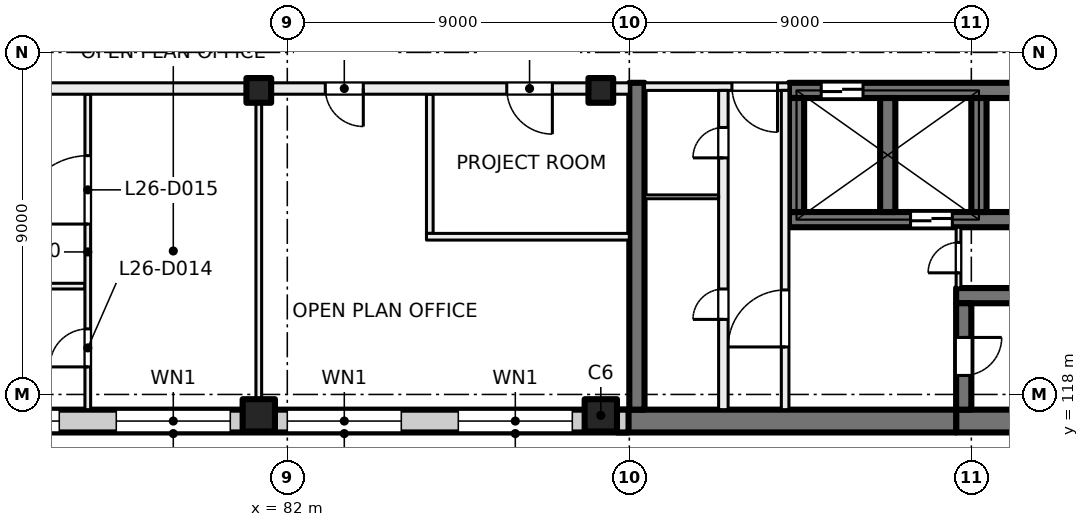
"""IFC4 building model, lengths in metres.
Left out: names, types, materials, properties, quantities, classifications, styles, units other than length and angle.
Written with IfcOpenShell. Run it as: python <this file> out.ifc"""

import sys

from ifc_helpers import new_model, si_unit, direction, frame, frame_2d, origin, origin_2d, place, context, subcontext, project, spatial, rectangle, extrude, element, fill, save


model = new_model("IFC4")
c1 = context("Model", 3, precision=1e-05, world=origin(), true_north=direction((0.0, 1.0)))
c2 = subcontext(c1, "Body", "Model", "MODEL_VIEW")
j1 = project(units=[si_unit("LENGTHUNIT", "METRE"), si_unit("PLANEANGLEUNIT", "RADIAN")], contexts=[c1])
p1 = place(None, origin())
s1 = spatial("IfcSite", under=j1, at=p1, CompositionType="ELEMENT")
p2 = place(p1, origin())
s2 = spatial("IfcBuilding", under=s1, at=p2, CompositionType="ELEMENT")
p3 = place(p2, frame((0.0, 0.0, 113.0)))
s3 = spatial("IfcBuildingStorey", under=s2, at=p3, CompositionType="ELEMENT", Elevation=113.0)
for number, where, z_axis, x_axis in (
    (1, (81.25, 126.0, 0.0), (0.0, 0.0, 1.0), (1.0, 0.0, 0.0)),
    (2, (90.25, 126.0, 0.0), (0.0, 0.0, 1.0), (1.0, 0.0, 0.0)),
):
    element("IfcColumn", number, at=place(p3, frame(where, z_axis=z_axis, x_axis=x_axis)), inside=s3, PredefinedType="COLUMN", context=c2, shape_type="SweptSolid", body=[
        extrude(rectangle(XDim=0.65, YDim=0.65, at=origin_2d()), origin(), (0.0, 0.0, 1.0), 4.0),
    ])
for number, where, z_axis, x_axis in (
    (3, (81.25, 117.45, 0.0), (0.0, 0.0, 1.0), (1.0, 0.0, 0.0)),
    (4, (90.25, 117.45, 0.0), (0.0, 0.0, 1.0), (1.0, 0.0, 0.0)),
):
    element("IfcColumn", number, at=place(p3, frame(where, z_axis=z_axis, x_axis=x_axis)), inside=s3, PredefinedType="COLUMN", context=c2, shape_type="SweptSolid", body=[
        extrude(rectangle(XDim=0.85, YDim=0.85, at=origin_2d()), origin(), (0.0, 0.0, 1.0), 4.0),
    ])
p4 = place(p3, frame((107.4, 117.3, 0.0), z_axis=(0.0, 0.0, 1.0), x_axis=(-1.0, 0.0, 0.0)))
e5 = element("IfcWall", 5, at=p4, inside=s3, PredefinedType="SHEAR", context=c2, shape_type="SweptSolid", body=[
    extrude(rectangle(XDim=7.8, YDim=0.6, at=frame_2d((3.9, 0.0))), origin(), (0.0, 0.0, 1.0), 4.0),
])
p5 = place(p3, frame((99.6, 117.3, 0.0), z_axis=(0.0, 0.0, 1.0), x_axis=(-1.0, 0.0, 0.0)))
e6 = element("IfcWall", 6, at=p5, inside=s3, PredefinedType="SHEAR", context=c2, shape_type="SweptSolid", body=[
    extrude(rectangle(XDim=8.925, YDim=0.6, at=frame_2d((4.462, 0.0))), origin(), (0.0, 0.0, 1.0), 4.0),
])
p6 = place(p3, frame((107.4, 120.6, 0.0), z_axis=(0.0, 0.0, 1.0), x_axis=(-1.0, 0.0, 0.0)))
e7 = element("IfcWall", 7, at=p6, inside=s3, PredefinedType="SHEAR", context=c2, shape_type="SweptSolid", body=[
    extrude(rectangle(XDim=7.8, YDim=0.4, at=frame_2d((3.9, 0.0))), origin(), (0.0, 0.0, 1.0), 4.0),
])
p7 = place(p3, frame((99.8, 120.4, 0.0), z_axis=(0.0, 0.0, 1.0), x_axis=(0.0, -1.0, 0.0)))
e8 = element("IfcWall", 8, at=p7, inside=s3, PredefinedType="SHEAR", context=c2, shape_type="SweptSolid", body=[
    extrude(rectangle(XDim=2.8, YDim=0.4, at=frame_2d((1.4, 0.0))), origin(), (0.0, 0.0, 1.0), 4.0),
])
p8 = place(p7, frame((0.9, 0.0, 0.0)))
e9 = element("IfcOpeningElement", 9, at=p8, cuts=e8, PredefinedType="OPENING", context=c2, shape_type="SweptSolid", body=[
    extrude(rectangle(XDim=1.0, YDim=2.1, at=frame_2d((0.5, 1.05))), frame((0.0, 0.21, 0.0), z_axis=(0.0, -1.0, 0.0), x_axis=(1.0, 0.0, 0.0)), (0.0, 0.0, 1.0), 0.42),
])
p9 = place(p3, frame((107.4, 126.0, 0.0), z_axis=(0.0, 0.0, 1.0), x_axis=(-1.0, 0.0, 0.0)))
e10 = element("IfcWall", 10, at=p9, inside=s3, PredefinedType="SHEAR", context=c2, shape_type="SweptSolid", body=[
    extrude(rectangle(XDim=12.2, YDim=0.4, at=frame_2d((6.1, 0.0))), origin(), (0.0, 0.0, 1.0), 4.0),
])
p10 = place(p9, frame((10.25, 0.0, 0.0)))
e11 = element("IfcOpeningElement", 11, at=p10, cuts=e10, PredefinedType="OPENING", context=c2, shape_type="SweptSolid", body=[
    extrude(rectangle(XDim=1.1, YDim=2.1, at=frame_2d((0.55, 1.05))), frame((0.0, 0.21, 0.0), z_axis=(0.0, -1.0, 0.0), x_axis=(1.0, 0.0, 0.0)), (0.0, 0.0, 1.0), 0.42),
])
p11 = place(p9, frame((0.6, 0.0, 0.0)))
e12 = element("IfcOpeningElement", 12, at=p11, cuts=e10, PredefinedType="OPENING", context=c2, shape_type="SweptSolid", body=[
    extrude(rectangle(XDim=1.0, YDim=2.1, at=frame_2d((0.5, 1.05))), frame((0.0, 0.21, 0.0), z_axis=(0.0, -1.0, 0.0), x_axis=(1.0, 0.0, 0.0)), (0.0, 0.0, 1.0), 0.42),
])
p12 = place(p3, frame((107.4, 122.6, 0.0), z_axis=(0.0, 0.0, 1.0), x_axis=(-1.0, 0.0, 0.0)))
e13 = element("IfcWall", 13, at=p12, inside=s3, PredefinedType="SHEAR", context=c2, shape_type="SweptSolid", body=[
    extrude(rectangle(XDim=12.2, YDim=0.4, at=frame_2d((6.1, 0.0))), origin(), (0.0, 0.0, 1.0), 4.0),
])
p13 = place(p12, frame((7.9, 0.0, 0.0)))
e14 = element("IfcOpeningElement", 14, at=p13, cuts=e13, PredefinedType="OPENING", context=c2, shape_type="SweptSolid", body=[
    extrude(rectangle(XDim=1.1, YDim=2.1, at=frame_2d((0.55, 1.05))), frame((0.0, 0.21, 0.0), z_axis=(0.0, -1.0, 0.0), x_axis=(1.0, 0.0, 0.0)), (0.0, 0.0, 1.0), 0.42),
])
for number, where, z_axis, x_axis in (
    (15, (100.2, 125.8, 0.0), (0.0, 0.0, 1.0), (0.0, -1.0, 0.0)),
    (16, (97.8, 125.8, 0.0), (0.0, 0.0, 1.0), (0.0, -1.0, 0.0)),
    (17, (95.4, 125.8, 0.0), (0.0, 0.0, 1.0), (0.0, -1.0, 0.0)),
):
    element("IfcWall", number, at=place(p3, frame(where, z_axis=z_axis, x_axis=x_axis)), inside=s3, PredefinedType="SHEAR", context=c2, shape_type="SweptSolid", body=[
        extrude(rectangle(XDim=3.0, YDim=0.4, at=frame_2d((1.5, 0.0))), origin(), (0.0, 0.0, 1.0), 4.0),
    ])
p14 = place(p3, frame((91.2, 126.2, 0.0), z_axis=(0.0, 0.0, 1.0), x_axis=(0.0, -1.0, 0.0)))
e18 = element("IfcWall", 18, at=p14, inside=s3, PredefinedType="SHEAR", context=c2, shape_type="SweptSolid", body=[
    extrude(rectangle(XDim=8.6, YDim=0.4, at=frame_2d((4.3, 0.0))), origin(), (0.0, 0.0, 1.0), 4.0),
])
p15 = place(p3, frame((90.98, 117.3, 0.0), z_axis=(0.0, 0.0, 1.0), x_axis=(-1.0, 0.0, 0.0)))
e19 = element("IfcWall", 19, at=p15, inside=s3, PredefinedType="SOLIDWALL", context=c2, shape_type="SweptSolid", body=[
    extrude(rectangle(XDim=33.745, YDim=0.6, at=frame_2d((16.873, 0.0))), origin(), (0.0, 0.0, 1.0), 3.625),
])
p16 = place(p15, frame((1.48, 0.0, 0.9)))
e20 = element("IfcOpeningElement", 20, at=p16, cuts=e19, PredefinedType="OPENING", context=c2, shape_type="SweptSolid", body=[
    extrude(rectangle(XDim=3.0, YDim=2.4, at=frame_2d((1.5, 1.2))), frame((0.0, 0.31, 0.0), z_axis=(0.0, -1.0, 0.0), x_axis=(1.0, 0.0, 0.0)), (0.0, 0.0, 1.0), 0.62),
])
p17 = place(p15, frame((5.98, 0.0, 0.9)))
e21 = element("IfcOpeningElement", 21, at=p17, cuts=e19, PredefinedType="OPENING", context=c2, shape_type="SweptSolid", body=[
    extrude(rectangle(XDim=3.0, YDim=2.4, at=frame_2d((1.5, 1.2))), frame((0.0, 0.31, 0.0), z_axis=(0.0, -1.0, 0.0), x_axis=(1.0, 0.0, 0.0)), (0.0, 0.0, 1.0), 0.62),
])
p18 = place(p15, frame((10.48, 0.0, 0.9)))
e22 = element("IfcOpeningElement", 22, at=p18, cuts=e19, PredefinedType="OPENING", context=c2, shape_type="SweptSolid", body=[
    extrude(rectangle(XDim=3.0, YDim=2.4, at=frame_2d((1.5, 1.2))), frame((0.0, 0.31, 0.0), z_axis=(0.0, -1.0, 0.0), x_axis=(1.0, 0.0, 0.0)), (0.0, 0.0, 1.0), 0.62),
])
p19 = place(p15, frame((14.98, 0.0, 0.9)))
e23 = element("IfcOpeningElement", 23, at=p19, cuts=e19, PredefinedType="OPENING", context=c2, shape_type="SweptSolid", body=[
    extrude(rectangle(XDim=3.0, YDim=2.4, at=frame_2d((1.5, 1.2))), frame((0.0, 0.31, 0.0), z_axis=(0.0, -1.0, 0.0), x_axis=(1.0, 0.0, 0.0)), (0.0, 0.0, 1.0), 0.62),
])
p20 = place(p15, frame((19.48, 0.0, 0.9)))
e24 = element("IfcOpeningElement", 24, at=p20, cuts=e19, PredefinedType="OPENING", context=c2, shape_type="SweptSolid", body=[
    extrude(rectangle(XDim=3.0, YDim=2.4, at=frame_2d((1.5, 1.2))), frame((0.0, 0.31, 0.0), z_axis=(0.0, -1.0, 0.0), x_axis=(1.0, 0.0, 0.0)), (0.0, 0.0, 1.0), 0.62),
])
p21 = place(p15, frame((23.98, 0.0, 0.9)))
e25 = element("IfcOpeningElement", 25, at=p21, cuts=e19, PredefinedType="OPENING", context=c2, shape_type="SweptSolid", body=[
    extrude(rectangle(XDim=3.0, YDim=2.4, at=frame_2d((1.5, 1.2))), frame((0.0, 0.31, 0.0), z_axis=(0.0, -1.0, 0.0), x_axis=(1.0, 0.0, 0.0)), (0.0, 0.0, 1.0), 0.62),
])
p22 = place(p15, frame((28.48, 0.0, 0.9)))
e26 = element("IfcOpeningElement", 26, at=p22, cuts=e19, PredefinedType="OPENING", context=c2, shape_type="SweptSolid", body=[
    extrude(rectangle(XDim=3.0, YDim=2.4, at=frame_2d((1.5, 1.2))), frame((0.0, 0.31, 0.0), z_axis=(0.0, -1.0, 0.0), x_axis=(1.0, 0.0, 0.0)), (0.0, 0.0, 1.0), 0.62),
])
p23 = place(p3, frame((95.2, 126.1, 0.0), z_axis=(0.0, 0.0, 1.0), x_axis=(-1.0, 0.0, 0.0)))
e27 = element("IfcWall", 27, at=p23, inside=s3, PredefinedType="PARTITIONING", context=c2, shape_type="SweptSolid", body=[
    extrude(rectangle(XDim=3.8, YDim=0.2, at=frame_2d((1.9, 0.0))), origin(), (0.0, 0.0, 1.0), 3.625),
])
p24 = place(p23, frame((0.3, 0.0, 0.0)))
e28 = element("IfcOpeningElement", 28, at=p24, cuts=e27, PredefinedType="OPENING", context=c2, shape_type="SweptSolid", body=[
    extrude(rectangle(XDim=1.2, YDim=2.1, at=frame_2d((0.6, 1.05))), frame((0.0, 0.11, 0.0), z_axis=(0.0, -1.0, 0.0), x_axis=(1.0, 0.0, 0.0)), (0.0, 0.0, 1.0), 0.22),
])
p25 = place(p3, frame((95.1, 117.6, 0.0), z_axis=(0.0, 0.0, 1.0), x_axis=(0.0, 1.0, 0.0)))
e29 = element("IfcWall", 29, at=p25, inside=s3, PredefinedType="PARTITIONING", context=c2, shape_type="SweptSolid", body=[
    extrude(rectangle(XDim=8.4, YDim=0.2, at=frame_2d((4.2, 0.0))), origin(), (0.0, 0.0, 1.0), 3.625),
])
p26 = place(p25, frame((1.65, 0.0, 0.0)))
e30 = element("IfcOpeningElement", 30, at=p26, cuts=e29, PredefinedType="OPENING", context=c2, shape_type="SweptSolid", body=[
    extrude(rectangle(XDim=1.5, YDim=2.1, at=frame_2d((0.75, 1.05))), frame((0.0, 0.11, 0.0), z_axis=(0.0, -1.0, 0.0), x_axis=(1.0, 0.0, 0.0)), (0.0, 0.0, 1.0), 0.22),
])
p27 = place(p3, frame((93.475, 117.6, 0.0), z_axis=(0.0, 0.0, 1.0), x_axis=(0.0, 1.0, 0.0)))
e31 = element("IfcWall", 31, at=p27, inside=s3, PredefinedType="PARTITIONING", context=c2, shape_type="SweptSolid", body=[
    extrude(rectangle(XDim=8.4, YDim=0.25, at=frame_2d((4.2, 0.0))), origin(), (0.0, 0.0, 1.0), 3.625),
])
p28 = place(p27, frame((6.625, 0.0, 0.0)))
e32 = element("IfcOpeningElement", 32, at=p28, cuts=e31, PredefinedType="OPENING", context=c2, shape_type="SweptSolid", body=[
    extrude(rectangle(XDim=0.8, YDim=2.1, at=frame_2d((0.4, 1.05))), frame((0.0, 0.135, 0.0), z_axis=(0.0, -1.0, 0.0), x_axis=(1.0, 0.0, 0.0)), (0.0, 0.0, 1.0), 0.27),
])
p29 = place(p27, frame((2.375, 0.0, 0.0)))
e33 = element("IfcOpeningElement", 33, at=p29, cuts=e31, PredefinedType="OPENING", context=c2, shape_type="SweptSolid", body=[
    extrude(rectangle(XDim=0.8, YDim=2.1, at=frame_2d((0.4, 1.05))), frame((0.0, 0.135, 0.0), z_axis=(0.0, -1.0, 0.0), x_axis=(1.0, 0.0, 0.0)), (0.0, 0.0, 1.0), 0.27),
])
p30 = place(p3, frame((99.663, 120.8, 0.0), z_axis=(0.0, 0.0, 1.0), x_axis=(0.0, 1.0, 0.0)))
e34 = element("IfcWall", 34, at=p30, inside=s3, PredefinedType="PARTITIONING", context=c2, shape_type="SweptSolid", body=[
    extrude(rectangle(XDim=1.6, YDim=0.125, at=frame_2d((0.8, 0.0))), origin(), (0.0, 0.0, 1.0), 3.625),
])
p31 = place(p30, frame((0.4, 0.0, 0.0)))
e35 = element("IfcOpeningElement", 35, at=p31, cuts=e34, PredefinedType="OPENING", context=c2, shape_type="SweptSolid", body=[
    extrude(rectangle(XDim=0.8, YDim=2.1, at=frame_2d((0.4, 1.05))), frame((0.0, 0.073, 0.0), z_axis=(0.0, -1.0, 0.0), x_axis=(1.0, 0.0, 0.0)), (0.0, 0.0, 1.0), 0.145),
])
p32 = place(p3, frame((93.35, 123.2, 0.0), z_axis=(0.0, 0.0, 1.0), x_axis=(-1.0, 0.0, 0.0)))
e36 = element("IfcWall", 36, at=p32, inside=s3, PredefinedType="PARTITIONING", context=c2, shape_type="SweptSolid", body=[
    extrude(rectangle(XDim=1.95, YDim=0.1, at=frame_2d((0.975, 0.0))), origin(), (0.0, 0.0, 1.0), 3.625),
])
p33 = place(p3, frame((72.325, 120.85, 0.0), z_axis=(0.0, 0.0, 1.0), x_axis=(1.0, 0.0, 0.0)))
e37 = element("IfcWall", 37, at=p33, inside=s3, PredefinedType="PARTITIONING", context=c2, shape_type="SweptSolid", body=[
    extrude(rectangle(XDim=4.35, YDim=0.15, at=frame_2d((2.175, 0.0))), origin(), (0.0, 0.0, 1.0), 3.625),
])
p34 = place(p3, frame((76.75, 117.6, 0.0), z_axis=(0.0, 0.0, 1.0), x_axis=(0.0, 1.0, 0.0)))
e38 = element("IfcWall", 38, at=p34, inside=s3, PredefinedType="PARTITIONING", context=c2, shape_type="SweptSolid", body=[
    extrude(rectangle(XDim=8.3, YDim=0.15, at=frame_2d((4.15, 0.0))), origin(), (0.0, 0.0, 1.0), 3.625),
])
p35 = place(p34, frame((1.125, 0.0, 0.0)))
e39 = element("IfcOpeningElement", 39, at=p35, cuts=e38, PredefinedType="OPENING", context=c2, shape_type="SweptSolid", body=[
    extrude(rectangle(XDim=1.0, YDim=2.1, at=frame_2d((0.5, 1.05))), frame((0.0, 0.085, 0.0), z_axis=(0.0, -1.0, 0.0), x_axis=(1.0, 0.0, 0.0)), (0.0, 0.0, 1.0), 0.17),
])
p36 = place(p34, frame((4.884, 0.0, 0.0)))
e40 = element("IfcOpeningElement", 40, at=p36, cuts=e38, PredefinedType="OPENING", context=c2, shape_type="SweptSolid", body=[
    extrude(rectangle(XDim=1.8, YDim=2.1, at=frame_2d((0.9, 1.05))), frame((0.0, 0.085, 0.0), z_axis=(0.0, -1.0, 0.0), x_axis=(1.0, 0.0, 0.0)), (0.0, 0.0, 1.0), 0.17),
])
p37 = place(p3, frame((81.25, 117.6, 0.0), z_axis=(0.0, 0.0, 1.0), x_axis=(0.0, 1.0, 0.0)))
e41 = element("IfcWall", 41, at=p37, inside=s3, PredefinedType="PARTITIONING", context=c2, shape_type="SweptSolid", body=[
    extrude(rectangle(XDim=8.3, YDim=0.15, at=frame_2d((4.15, 0.0))), origin(), (0.0, 0.0, 1.0), 3.625),
])
p38 = place(p3, frame((85.75, 122.238, 0.0), z_axis=(0.0, 0.0, 1.0), x_axis=(0.0, 1.0, 0.0)))
e42 = element("IfcWall", 42, at=p38, inside=s3, PredefinedType="PARTITIONING", context=c2, shape_type="SweptSolid", body=[
    extrude(rectangle(XDim=3.662, YDim=0.175, at=frame_2d((1.831, 0.0))), origin(), (0.0, 0.0, 1.0), 3.625),
])
p39 = place(p3, frame((91.0, 122.15, 0.0), z_axis=(0.0, 0.0, 1.0), x_axis=(-1.0, 0.0, 0.0)))
e43 = element("IfcWall", 43, at=p39, inside=s3, PredefinedType="PARTITIONING", context=c2, shape_type="SweptSolid", body=[
    extrude(rectangle(XDim=5.338, YDim=0.175, at=frame_2d((2.669, 0.0))), origin(), (0.0, 0.0, 1.0), 3.625),
])
p40 = place(p3, frame((91.0, 126.05, 0.0), z_axis=(0.0, 0.0, 1.0), x_axis=(-1.0, 0.0, 0.0)))
e44 = element("IfcWall", 44, at=p40, inside=s3, PredefinedType="PARTITIONING", context=c2, shape_type="SweptSolid", body=[
    extrude(rectangle(XDim=43.785, YDim=0.3, at=frame_2d((21.893, 0.0))), origin(), (0.0, 0.0, 1.0), 3.625),
])
p41 = place(p40, frame((2.025, 0.0, 0.0)))
e45 = element("IfcOpeningElement", 45, at=p41, cuts=e44, PredefinedType="OPENING", context=c2, shape_type="SweptSolid", body=[
    extrude(rectangle(XDim=1.2, YDim=2.1, at=frame_2d((0.6, 1.05))), frame((0.0, 0.16, 0.0), z_axis=(0.0, -1.0, 0.0), x_axis=(1.0, 0.0, 0.0)), (0.0, 0.0, 1.0), 0.32),
])
p42 = place(p40, frame((7.0, 0.0, 0.0)))
e46 = element("IfcOpeningElement", 46, at=p42, cuts=e44, PredefinedType="OPENING", context=c2, shape_type="SweptSolid", body=[
    extrude(rectangle(XDim=1.0, YDim=2.1, at=frame_2d((0.5, 1.05))), frame((0.0, 0.16, 0.0), z_axis=(0.0, -1.0, 0.0), x_axis=(1.0, 0.0, 0.0)), (0.0, 0.0, 1.0), 0.32),
])
p43 = place(p40, frame((16.0, 0.0, 0.0)))
e47 = element("IfcOpeningElement", 47, at=p43, cuts=e44, PredefinedType="OPENING", context=c2, shape_type="SweptSolid", body=[
    extrude(rectangle(XDim=1.0, YDim=2.1, at=frame_2d((0.5, 1.05))), frame((0.0, 0.16, 0.0), z_axis=(0.0, -1.0, 0.0), x_axis=(1.0, 0.0, 0.0)), (0.0, 0.0, 1.0), 0.32),
])
p44 = place(p40, frame((28.85, 0.0, 0.0)))
e48 = element("IfcOpeningElement", 48, at=p44, cuts=e44, PredefinedType="OPENING", context=c2, shape_type="SweptSolid", body=[
    extrude(rectangle(XDim=1.8, YDim=2.1, at=frame_2d((0.9, 1.05))), frame((0.0, 0.16, 0.0), z_axis=(0.0, -1.0, 0.0), x_axis=(1.0, 0.0, 0.0)), (0.0, 0.0, 1.0), 0.32),
])
p45 = place(p40, frame((39.296, 0.0, 0.0)))
e49 = element("IfcOpeningElement", 49, at=p45, cuts=e44, PredefinedType="OPENING", context=c2, shape_type="SweptSolid", body=[
    extrude(rectangle(XDim=1.8, YDim=2.1, at=frame_2d((0.9, 1.05))), frame((0.0, 0.16, 0.0), z_axis=(0.0, -1.0, 0.0), x_axis=(1.0, 0.0, 0.0)), (0.0, 0.0, 1.0), 0.32),
])
p46 = place(p16, origin())
e50 = element("IfcWindow", 50, at=p46, inside=s3, PartitioningType="SINGLE_PANEL", PredefinedType="WINDOW", context=c2, shape_type="SweptSolid", body=[
    extrude(rectangle(XDim=3.0, YDim=2.4, at=frame_2d((1.5, 1.2))), frame((0.0, 0.03, 0.0), z_axis=(0.0, -1.0, 0.0), x_axis=(1.0, 0.0, 0.0)), (0.0, 0.0, 1.0), 0.06),
])
fill(e20, e50)
p47 = place(p17, origin())
e51 = element("IfcWindow", 51, at=p47, inside=s3, PartitioningType="SINGLE_PANEL", PredefinedType="WINDOW", context=c2, shape_type="SweptSolid", body=[
    extrude(rectangle(XDim=3.0, YDim=2.4, at=frame_2d((1.5, 1.2))), frame((0.0, 0.03, 0.0), z_axis=(0.0, -1.0, 0.0), x_axis=(1.0, 0.0, 0.0)), (0.0, 0.0, 1.0), 0.06),
])
fill(e21, e51)
p48 = place(p18, origin())
e52 = element("IfcWindow", 52, at=p48, inside=s3, PartitioningType="SINGLE_PANEL", PredefinedType="WINDOW", context=c2, shape_type="SweptSolid", body=[
    extrude(rectangle(XDim=3.0, YDim=2.4, at=frame_2d((1.5, 1.2))), frame((0.0, 0.03, 0.0), z_axis=(0.0, -1.0, 0.0), x_axis=(1.0, 0.0, 0.0)), (0.0, 0.0, 1.0), 0.06),
])
fill(e22, e52)
p49 = place(p19, origin())
e53 = element("IfcWindow", 53, at=p49, inside=s3, PartitioningType="SINGLE_PANEL", PredefinedType="WINDOW", context=c2, shape_type="SweptSolid", body=[
    extrude(rectangle(XDim=3.0, YDim=2.4, at=frame_2d((1.5, 1.2))), frame((0.0, 0.03, 0.0), z_axis=(0.0, -1.0, 0.0), x_axis=(1.0, 0.0, 0.0)), (0.0, 0.0, 1.0), 0.06),
])
fill(e23, e53)
p50 = place(p10, origin())
e54 = element("IfcDoor", 54, at=p50, inside=s3, OperationType="DOUBLE_DOOR_SLIDING", PredefinedType="DOOR", context=c2, shape_type="SweptSolid", body=[
    extrude(rectangle(XDim=1.1, YDim=2.1, at=frame_2d((0.55, 1.05))), frame((0.0, 0.025, 0.0), z_axis=(0.0, -1.0, 0.0), x_axis=(1.0, 0.0, 0.0)), (0.0, 0.0, 1.0), 0.05),
])
fill(e11, e54)
p51 = place(p24, origin())
e55 = element("IfcDoor", 55, at=p51, inside=s3, OperationType="DOUBLE_DOOR_SINGLE_SWING", PredefinedType="DOOR", context=c2, shape_type="SweptSolid", body=[
    extrude(rectangle(XDim=1.2, YDim=2.1, at=frame_2d((0.6, 1.05))), frame((0.0, 0.025, 0.0), z_axis=(0.0, -1.0, 0.0), x_axis=(1.0, 0.0, 0.0)), (0.0, 0.0, 1.0), 0.05),
])
fill(e28, e55)
p52 = place(p26, origin())
e56 = element("IfcDoor", 56, at=p52, inside=s3, OperationType="DOUBLE_DOOR_SINGLE_SWING", PredefinedType="DOOR", context=c2, shape_type="SweptSolid", body=[
    extrude(rectangle(XDim=1.5, YDim=2.1, at=frame_2d((0.75, 1.05))), frame((0.0, 0.025, 0.0), z_axis=(0.0, -1.0, 0.0), x_axis=(1.0, 0.0, 0.0)), (0.0, 0.0, 1.0), 0.05),
])
fill(e30, e56)
p53 = place(p8, origin())
e57 = element("IfcDoor", 57, at=p53, inside=s3, OperationType="SINGLE_SWING_LEFT", PredefinedType="DOOR", context=c2, shape_type="SweptSolid", body=[
    extrude(rectangle(XDim=1.0, YDim=2.1, at=frame_2d((0.5, 1.05))), frame((0.0, 0.025, 0.0), z_axis=(0.0, -1.0, 0.0), x_axis=(1.0, 0.0, 0.0)), (0.0, 0.0, 1.0), 0.05),
])
fill(e9, e57)
p54 = place(p31, origin())
e58 = element("IfcDoor", 58, at=p54, inside=s3, OperationType="SINGLE_SWING_RIGHT", PredefinedType="DOOR", context=c2, shape_type="SweptSolid", body=[
    extrude(rectangle(XDim=0.8, YDim=2.1, at=frame_2d((0.4, 1.05))), frame((0.0, 0.025, 0.0), z_axis=(0.0, -1.0, 0.0), x_axis=(1.0, 0.0, 0.0)), (0.0, 0.0, 1.0), 0.05),
])
fill(e35, e58)
p55 = place(p28, origin())
e59 = element("IfcDoor", 59, at=p55, inside=s3, OperationType="SINGLE_SWING_LEFT", PredefinedType="DOOR", context=c2, shape_type="SweptSolid", body=[
    extrude(rectangle(XDim=0.8, YDim=2.1, at=frame_2d((0.4, 1.05))), frame((0.0, 0.025, 0.0), z_axis=(0.0, -1.0, 0.0), x_axis=(1.0, 0.0, 0.0)), (0.0, 0.0, 1.0), 0.05),
])
fill(e32, e59)
p56 = place(p29, origin())
e60 = element("IfcDoor", 60, at=p56, inside=s3, OperationType="SINGLE_SWING_RIGHT", PredefinedType="DOOR", context=c2, shape_type="SweptSolid", body=[
    extrude(rectangle(XDim=0.8, YDim=2.1, at=frame_2d((0.4, 1.05))), frame((0.0, 0.025, 0.0), z_axis=(0.0, -1.0, 0.0), x_axis=(1.0, 0.0, 0.0)), (0.0, 0.0, 1.0), 0.05),
])
fill(e33, e60)
p57 = place(p13, origin())
e61 = element("IfcDoor", 61, at=p57, inside=s3, OperationType="DOUBLE_DOOR_SLIDING", PredefinedType="DOOR", context=c2, shape_type="SweptSolid", body=[
    extrude(rectangle(XDim=1.1, YDim=2.1, at=frame_2d((0.55, 1.05))), frame((0.0, 0.025, 0.0), z_axis=(0.0, -1.0, 0.0), x_axis=(1.0, 0.0, 0.0)), (0.0, 0.0, 1.0), 0.05),
])
fill(e14, e61)
p58 = place(p41, origin())
e62 = element("IfcDoor", 62, at=p58, inside=s3, OperationType="DOUBLE_DOOR_SINGLE_SWING", PredefinedType="DOOR", context=c2, shape_type="SweptSolid", body=[
    extrude(rectangle(XDim=1.2, YDim=2.1, at=frame_2d((0.6, 1.05))), frame((0.0, 0.025, 0.0), z_axis=(0.0, -1.0, 0.0), x_axis=(1.0, 0.0, 0.0)), (0.0, 0.0, 1.0), 0.05),
])
fill(e45, e62)
p59 = place(p42, origin())
e63 = element("IfcDoor", 63, at=p59, inside=s3, OperationType="SINGLE_SWING_RIGHT", PredefinedType="DOOR", context=c2, shape_type="SweptSolid", body=[
    extrude(rectangle(XDim=1.0, YDim=2.1, at=frame_2d((0.5, 1.05))), frame((0.0, 0.025, 0.0), z_axis=(0.0, -1.0, 0.0), x_axis=(1.0, 0.0, 0.0)), (0.0, 0.0, 1.0), 0.05),
])
fill(e46, e63)
p60 = place(p35, origin())
e64 = element("IfcDoor", 64, at=p60, inside=s3, OperationType="SINGLE_SWING_RIGHT", PredefinedType="DOOR", context=c2, shape_type="SweptSolid", body=[
    extrude(rectangle(XDim=1.0, YDim=2.1, at=frame_2d((0.5, 1.05))), frame((0.0, 0.025, 0.0), z_axis=(0.0, -1.0, 0.0), x_axis=(1.0, 0.0, 0.0)), (0.0, 0.0, 1.0), 0.05),
])
fill(e39, e64)
p61 = place(p36, origin())
e65 = element("IfcDoor", 65, at=p61, inside=s3, OperationType="DOUBLE_DOOR_SINGLE_SWING", PredefinedType="DOOR", context=c2, shape_type="SweptSolid", body=[
    extrude(rectangle(XDim=1.8, YDim=2.1, at=frame_2d((0.9, 1.05))), frame((0.0, 0.025, 0.0), z_axis=(0.0, -1.0, 0.0), x_axis=(1.0, 0.0, 0.0)), (0.0, 0.0, 1.0), 0.05),
])
fill(e40, e65)
save(model, sys.argv[1])
